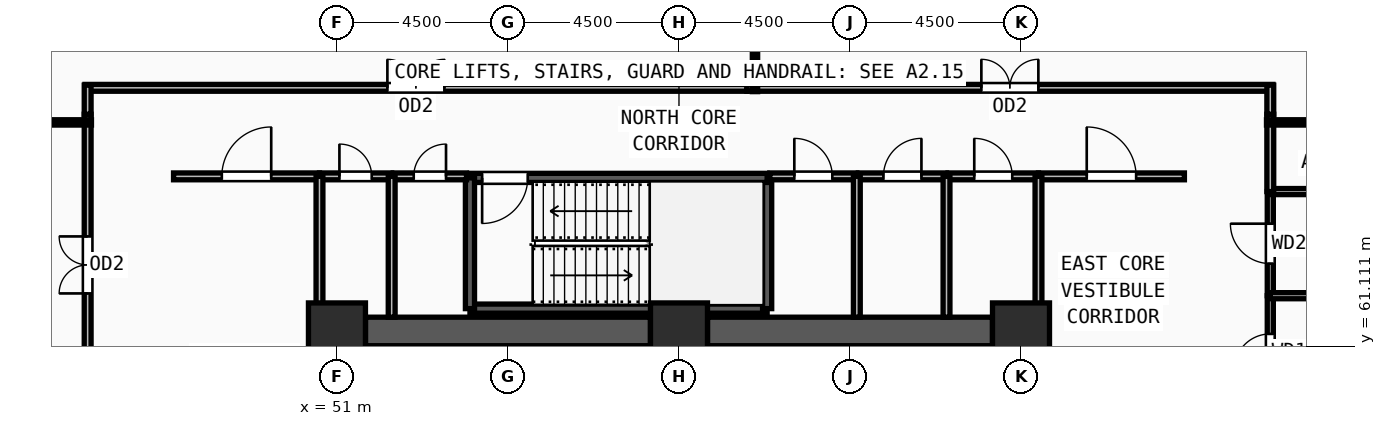
"""IFC4 building model, lengths in metres.
Left out: names, types, materials, properties, quantities, classifications, styles, units other than length and angle.
Written with IfcOpenShell. Run it as: python <this file> out.ifc"""

import sys

from ifc_helpers import new_model, si_unit, direction, frame, frame_2d, origin, origin_2d, place, context, subcontext, project, spatial, rectangle, extrude, source, transform, mapped, element, fill, save


model = new_model("IFC4")
c1 = context("Model", 3, precision=1e-05, world=origin(), true_north=direction((0.0, 1.0)))
c2 = subcontext(c1, "Body", "Model", "MODEL_VIEW")
j1 = project(units=[si_unit("LENGTHUNIT", "METRE"), si_unit("PLANEANGLEUNIT", "RADIAN")], contexts=[c1])
p1 = place(None, origin())
s1 = spatial("IfcSite", under=j1, at=p1, CompositionType="ELEMENT")
p2 = place(p1, origin())
s2 = spatial("IfcBuilding", under=s1, at=p2, CompositionType="ELEMENT")
p3 = place(p2, frame((0.0, 0.0, 166.5)))
s3 = spatial("IfcBuildingStorey", under=s2, at=p3, CompositionType="ELEMENT", Elevation=166.5)
m1 = source(origin(), c2, "Body", "SweptSolid", [
    extrude(rectangle(XDim=1.5, YDim=1.5, at=origin_2d()), origin(), (0.0, 0.0, 1.0), 3.75),
])
for number, where, z_axis, x_axis in (
    (1, (69.0, 61.5, 0.0), (0.0, 0.0, 1.0), (1.0, 0.0, 0.0)),
    (2, (60.0, 61.5, 0.0), (0.0, 0.0, 1.0), (1.0, 0.0, 0.0)),
    (3, (51.0, 61.5, 0.0), (0.0, 0.0, 1.0), (1.0, 0.0, 0.0)),
):
    element("IfcColumn", number, at=place(p3, frame(where, z_axis=z_axis, x_axis=x_axis)), inside=s3, PredefinedType="COLUMN", context=c2, shape_type="MappedRepresentation", body=[
        mapped(m1, transform((0.0, 0.0, 0.0), x_axis=(1.0, 0.0, 0.0), y_axis=(0.0, 1.0, 0.0), z_axis=(0.0, 0.0, 1.0), scale=1.0)),
    ])
for number, where, z_axis, x_axis in (
    (4, (51.75, 61.5, 0.0), (0.0, 0.0, 1.0), (1.0, 0.0, 0.0)),
    (5, (60.75, 61.5, 0.0), (0.0, 0.0, 1.0), (1.0, 0.0, 0.0)),
):
    element("IfcWall", number, at=place(p3, frame(where, z_axis=z_axis, x_axis=x_axis)), inside=s3, PredefinedType="SHEAR", context=c2, shape_type="SweptSolid", body=[
        extrude(rectangle(XDim=7.5, YDim=0.75, at=frame_2d((3.75, 0.0))), origin(), (0.0, 0.0, 1.0), 3.57),
    ])
p4 = place(p3, frame((54.5, 62.1, 0.0), z_axis=(0.0, 0.0, 1.0), x_axis=(1.0, 0.0, 0.0)))
e6 = element("IfcWall", 6, at=p4, inside=s3, PredefinedType="SOLIDWALL", context=c2, shape_type="SweptSolid", body=[
    extrude(rectangle(XDim=7.82, YDim=0.24, at=frame_2d((3.91, 0.0))), origin(), (0.0, 0.0, 1.0), 3.57),
])
p5 = place(p3, frame((62.32, 62.1, 0.0), z_axis=(0.0, 0.0, 1.0), x_axis=(0.0, 1.0, 0.0)))
e7 = element("IfcWall", 7, at=p5, inside=s3, PredefinedType="SOLIDWALL", context=c2, shape_type="SweptSolid", body=[
    extrude(rectangle(XDim=3.44, YDim=0.24, at=frame_2d((1.72, 0.0))), origin(), (0.0, 0.0, 1.0), 3.57),
])
p6 = place(p3, frame((62.32, 65.54, 0.0), z_axis=(0.0, 0.0, 1.0), x_axis=(-1.0, 0.0, 0.0)))
e8 = element("IfcWall", 8, at=p6, inside=s3, PredefinedType="SOLIDWALL", context=c2, shape_type="SweptSolid", body=[
    extrude(rectangle(XDim=7.82, YDim=0.24, at=frame_2d((3.91, 0.0))), origin(), (0.0, 0.0, 1.0), 3.57),
])
m2 = source(origin(), c2, "Body", "SweptSolid", [
    extrude(rectangle(XDim=1.2, YDim=2.2, at=frame_2d((0.6, 1.1))), frame((0.0, 0.13, 0.0), z_axis=(0.0, -1.0, 0.0), x_axis=(1.0, 0.0, 0.0)), (0.0, 0.0, 1.0), 0.26),
])
p7 = place(p6, frame((6.3, 0.0, 0.0)))
e9 = element("IfcOpeningElement", 9, at=p7, cuts=e8, PredefinedType="OPENING", context=c2, shape_type="MappedRepresentation", body=[
    mapped(m2, transform((0.0, 0.0, 0.0), x_axis=(1.0, 0.0, 0.0), y_axis=(0.0, 1.0, 0.0), z_axis=(0.0, 0.0, 1.0), scale=1.0)),
])
p8 = place(p3, frame((54.5, 65.54, 0.0), z_axis=(0.0, 0.0, 1.0), x_axis=(0.0, -1.0, 0.0)))
e10 = element("IfcWall", 10, at=p8, inside=s3, PredefinedType="SOLIDWALL", context=c2, shape_type="SweptSolid", body=[
    extrude(rectangle(XDim=3.44, YDim=0.24, at=frame_2d((1.72, 0.0))), origin(), (0.0, 0.0, 1.0), 3.57),
])
p9 = place(p3, frame((75.56, 59.48, 0.0), z_axis=(0.0, 0.0, 1.0), x_axis=(0.0, 1.0, 0.0)))
e11 = element("IfcWall", 11, at=p9, inside=s3, PredefinedType="PARTITIONING", context=c2, shape_type="SweptSolid", body=[
    extrude(rectangle(XDim=2.96, YDim=0.16, at=frame_2d((1.48, 0.0))), origin(), (0.0, 0.0, 1.0), 3.57),
])
m3 = source(origin(), c2, "Body", "SweptSolid", [
    extrude(rectangle(XDim=0.95, YDim=2.15, at=frame_2d((0.475, 1.075))), frame((0.0, 0.09, 0.0), z_axis=(0.0, -1.0, 0.0), x_axis=(1.0, 0.0, 0.0)), (0.0, 0.0, 1.0), 0.18),
])
p10 = place(p9, frame((1.005, 0.0, 0.0)))
e12 = element("IfcOpeningElement", 12, at=p10, cuts=e11, PredefinedType="OPENING", context=c2, shape_type="MappedRepresentation", body=[
    mapped(m3, transform((0.0, 0.0, 0.0), x_axis=(1.0, 0.0, 0.0), y_axis=(0.0, 1.0, 0.0), z_axis=(0.0, 0.0, 1.0), scale=1.0)),
])
p11 = place(p3, frame((75.56, 62.44, 0.0), z_axis=(0.0, 0.0, 1.0), x_axis=(0.0, 1.0, 0.0)))
e13 = element("IfcWall", 13, at=p11, inside=s3, PredefinedType="PARTITIONING", context=c2, shape_type="SweptSolid", body=[
    extrude(rectangle(XDim=2.74, YDim=0.16, at=frame_2d((1.37, 0.0))), origin(), (0.0, 0.0, 1.0), 3.57),
])
m4 = source(origin(), c2, "Body", "SweptSolid", [
    extrude(rectangle(XDim=1.05, YDim=2.15, at=frame_2d((0.525, 1.075))), frame((0.0, 0.09, 0.0), z_axis=(0.0, -1.0, 0.0), x_axis=(1.0, 0.0, 0.0)), (0.0, 0.0, 1.0), 0.18),
])
p12 = place(p11, frame((0.845, 0.0, 0.0)))
e14 = element("IfcOpeningElement", 14, at=p12, cuts=e13, PredefinedType="OPENING", context=c2, shape_type="MappedRepresentation", body=[
    mapped(m4, transform((0.0, 0.0, 0.0), x_axis=(1.0, 0.0, 0.0), y_axis=(0.0, 1.0, 0.0), z_axis=(0.0, 0.0, 1.0), scale=1.0)),
])
p13 = place(p3, frame((50.54, 65.58, 0.0), z_axis=(0.0, 0.0, 1.0), x_axis=(1.0, 0.0, 0.0)))
e15 = element("IfcWall", 15, at=p13, inside=s3, PredefinedType="PARTITIONING", context=c2, shape_type="SweptSolid", body=[
    extrude(rectangle(XDim=1.9, YDim=0.18, at=frame_2d((0.95, 0.0))), origin(), (0.0, 0.0, 1.0), 3.57),
])
m5 = source(origin(), c2, "Body", "SweptSolid", [
    extrude(rectangle(XDim=0.85, YDim=2.1, at=frame_2d((0.425, 1.05))), frame((0.0, 0.1, 0.0), z_axis=(0.0, -1.0, 0.0), x_axis=(1.0, 0.0, 0.0)), (0.0, 0.0, 1.0), 0.2),
])
p14 = place(p13, frame((0.525, 0.0, 0.0)))
e16 = element("IfcOpeningElement", 16, at=p14, cuts=e15, PredefinedType="OPENING", context=c2, shape_type="MappedRepresentation", body=[
    mapped(m5, transform((0.0, 0.0, 0.0), x_axis=(1.0, 0.0, 0.0), y_axis=(0.0, 1.0, 0.0), z_axis=(0.0, 0.0, 1.0), scale=1.0)),
])
p15 = place(p3, frame((52.48, 65.58, 0.0), z_axis=(0.0, 0.0, 1.0), x_axis=(1.0, 0.0, 0.0)))
e17 = element("IfcWall", 17, at=p15, inside=s3, PredefinedType="PARTITIONING", context=c2, shape_type="SweptSolid", body=[
    extrude(rectangle(XDim=1.93, YDim=0.18, at=frame_2d((0.965, 0.0))), origin(), (0.0, 0.0, 1.0), 3.57),
])
p16 = place(p15, frame((0.54, 0.0, 0.0)))
e18 = element("IfcOpeningElement", 18, at=p16, cuts=e17, PredefinedType="OPENING", context=c2, shape_type="MappedRepresentation", body=[
    mapped(m5, transform((0.0, 0.0, 0.0), x_axis=(1.0, 0.0, 0.0), y_axis=(0.0, 1.0, 0.0), z_axis=(0.0, 0.0, 1.0), scale=1.0)),
])
p17 = place(p3, frame((62.39, 65.58, 0.0), z_axis=(0.0, 0.0, 1.0), x_axis=(1.0, 0.0, 0.0)))
e19 = element("IfcWall", 19, at=p17, inside=s3, PredefinedType="PARTITIONING", context=c2, shape_type="SweptSolid", body=[
    extrude(rectangle(XDim=2.29, YDim=0.18, at=frame_2d((1.145, 0.0))), origin(), (0.0, 0.0, 1.0), 3.57),
])
m6 = source(origin(), c2, "Body", "SweptSolid", [
    extrude(rectangle(XDim=1.0, YDim=2.2, at=frame_2d((0.5, 1.1))), frame((0.0, 0.1, 0.0), z_axis=(0.0, -1.0, 0.0), x_axis=(1.0, 0.0, 0.0)), (0.0, 0.0, 1.0), 0.2),
])
p18 = place(p17, frame((0.645, 0.0, 0.0)))
e20 = element("IfcOpeningElement", 20, at=p18, cuts=e19, PredefinedType="OPENING", context=c2, shape_type="MappedRepresentation", body=[
    mapped(m6, transform((0.0, 0.0, 0.0), x_axis=(1.0, 0.0, 0.0), y_axis=(0.0, 1.0, 0.0), z_axis=(0.0, 0.0, 1.0), scale=1.0)),
])
p19 = place(p3, frame((64.72, 65.58, 0.0), z_axis=(0.0, 0.0, 1.0), x_axis=(1.0, 0.0, 0.0)))
e21 = element("IfcWall", 21, at=p19, inside=s3, PredefinedType="PARTITIONING", context=c2, shape_type="SweptSolid", body=[
    extrude(rectangle(XDim=2.32, YDim=0.18, at=frame_2d((1.16, 0.0))), origin(), (0.0, 0.0, 1.0), 3.57),
])
p20 = place(p19, frame((0.66, 0.0, 0.0)))
e22 = element("IfcOpeningElement", 22, at=p20, cuts=e21, PredefinedType="OPENING", context=c2, shape_type="MappedRepresentation", body=[
    mapped(m6, transform((0.0, 0.0, 0.0), x_axis=(1.0, 0.0, 0.0), y_axis=(0.0, 1.0, 0.0), z_axis=(0.0, 0.0, 1.0), scale=1.0)),
])
p21 = place(p3, frame((67.08, 65.58, 0.0), z_axis=(0.0, 0.0, 1.0), x_axis=(1.0, 0.0, 0.0)))
e23 = element("IfcWall", 23, at=p21, inside=s3, PredefinedType="PARTITIONING", context=c2, shape_type="SweptSolid", body=[
    extrude(rectangle(XDim=2.38, YDim=0.18, at=frame_2d((1.19, 0.0))), origin(), (0.0, 0.0, 1.0), 3.57),
])
p22 = place(p21, frame((0.69, 0.0, 0.0)))
e24 = element("IfcOpeningElement", 24, at=p22, cuts=e23, PredefinedType="OPENING", context=c2, shape_type="MappedRepresentation", body=[
    mapped(m6, transform((0.0, 0.0, 0.0), x_axis=(1.0, 0.0, 0.0), y_axis=(0.0, 1.0, 0.0), z_axis=(0.0, 0.0, 1.0), scale=1.0)),
])
p23 = place(p3, frame((46.7, 65.58, 0.0), z_axis=(0.0, 0.0, 1.0), x_axis=(1.0, 0.0, 0.0)))
e25 = element("IfcWall", 25, at=p23, inside=s3, PredefinedType="PARTITIONING", context=c2, shape_type="SweptSolid", body=[
    extrude(rectangle(XDim=3.84, YDim=0.18, at=frame_2d((1.92, 0.0))), origin(), (0.0, 0.0, 1.0), 3.57),
])
m7 = source(origin(), c2, "Body", "SweptSolid", [
    extrude(rectangle(XDim=1.3, YDim=2.2, at=frame_2d((0.65, 1.1))), frame((0.0, 0.1, 0.0), z_axis=(0.0, -1.0, 0.0), x_axis=(1.0, 0.0, 0.0)), (0.0, 0.0, 1.0), 0.2),
])
p24 = place(p23, frame((1.27, 0.0, 0.0)))
e26 = element("IfcOpeningElement", 26, at=p24, cuts=e25, PredefinedType="OPENING", context=c2, shape_type="MappedRepresentation", body=[
    mapped(m7, transform((0.0, 0.0, 0.0), x_axis=(1.0, 0.0, 0.0), y_axis=(0.0, 1.0, 0.0), z_axis=(0.0, 0.0, 1.0), scale=1.0)),
])
p25 = place(p3, frame((69.46, 65.58, 0.0), z_axis=(0.0, 0.0, 1.0), x_axis=(1.0, 0.0, 0.0)))
e27 = element("IfcWall", 27, at=p25, inside=s3, PredefinedType="PARTITIONING", context=c2, shape_type="SweptSolid", body=[
    extrude(rectangle(XDim=3.84, YDim=0.18, at=frame_2d((1.92, 0.0))), origin(), (0.0, 0.0, 1.0), 3.57),
])
p26 = place(p25, frame((1.27, 0.0, 0.0)))
e28 = element("IfcOpeningElement", 28, at=p26, cuts=e27, PredefinedType="OPENING", context=c2, shape_type="MappedRepresentation", body=[
    mapped(m7, transform((0.0, 0.0, 0.0), x_axis=(1.0, 0.0, 0.0), y_axis=(0.0, 1.0, 0.0), z_axis=(0.0, 0.0, 1.0), scale=1.0)),
])
p27 = place(p3, frame((61.785, 67.91, 0.0), z_axis=(0.0, 0.0, 1.0), x_axis=(1.0, 0.0, 0.0)))
e29 = element("IfcWall", 29, at=p27, inside=s3, PredefinedType="PARTITIONING", context=c2, shape_type="SweptSolid", body=[
    extrude(rectangle(XDim=13.845, YDim=0.18, at=frame_2d((6.922, 0.0))), origin(), (0.0, 0.0, 1.0), 3.57),
])
m8 = source(origin(), c2, "Body", "SweptSolid", [
    extrude(rectangle(XDim=1.5, YDim=2.2, at=frame_2d((0.75, 1.1))), frame((0.0, 0.1, 0.0), z_axis=(0.0, -1.0, 0.0), x_axis=(1.0, 0.0, 0.0)), (0.0, 0.0, 1.0), 0.2),
])
p28 = place(p27, frame((6.172, 0.0, 0.0)))
e30 = element("IfcOpeningElement", 30, at=p28, cuts=e29, PredefinedType="OPENING", context=c2, shape_type="MappedRepresentation", body=[
    mapped(m8, transform((0.0, 0.0, 0.0), x_axis=(1.0, 0.0, 0.0), y_axis=(0.0, 1.0, 0.0), z_axis=(0.0, 0.0, 1.0), scale=1.0)),
])
p29 = place(p3, frame((44.37, 67.91, 0.0), z_axis=(0.0, 0.0, 1.0), x_axis=(1.0, 0.0, 0.0)))
e31 = element("IfcWall", 31, at=p29, inside=s3, PredefinedType="PARTITIONING", context=c2, shape_type="SweptSolid", body=[
    extrude(rectangle(XDim=17.415, YDim=0.18, at=frame_2d((8.708, 0.0))), origin(), (0.0, 0.0, 1.0), 3.57),
])
p30 = place(p29, frame((7.957, 0.0, 0.0)))
e32 = element("IfcOpeningElement", 32, at=p30, cuts=e31, PredefinedType="OPENING", context=c2, shape_type="MappedRepresentation", body=[
    mapped(m8, transform((0.0, 0.0, 0.0), x_axis=(1.0, 0.0, 0.0), y_axis=(0.0, 1.0, 0.0), z_axis=(0.0, 0.0, 1.0), scale=1.0)),
])
p31 = place(p3, frame((44.44, 59.285, 0.0), z_axis=(0.0, 0.0, 1.0), x_axis=(0.0, 1.0, 0.0)))
e33 = element("IfcWall", 33, at=p31, inside=s3, PredefinedType="PARTITIONING", context=c2, shape_type="SweptSolid", body=[
    extrude(rectangle(XDim=7.93, YDim=0.18, at=frame_2d((3.965, 0.0))), origin(), (0.0, 0.0, 1.0), 3.57),
])
p32 = place(p31, frame((3.215, 0.0, 0.0)))
e34 = element("IfcOpeningElement", 34, at=p32, cuts=e33, PredefinedType="OPENING", context=c2, shape_type="MappedRepresentation", body=[
    mapped(m8, transform((0.0, 0.0, 0.0), x_axis=(1.0, 0.0, 0.0), y_axis=(0.0, 1.0, 0.0), z_axis=(0.0, 0.0, 1.0), scale=1.0)),
])
for number, where, z_axis, x_axis in (
    (35, (75.56, 62.44, 0.0), (0.0, 0.0, 1.0), (1.0, 0.0, 0.0)),
    (36, (75.56, 65.18, 0.0), (0.0, 0.0, 1.0), (1.0, 0.0, 0.0)),
):
    element("IfcWall", number, at=place(p3, frame(where, z_axis=z_axis, x_axis=x_axis)), inside=s3, PredefinedType="PARTITIONING", context=c2, shape_type="SweptSolid", body=[
        extrude(rectangle(XDim=4.46, YDim=0.16, at=frame_2d((2.23, 0.0))), origin(), (0.0, 0.0, 1.0), 3.57),
    ])
p33 = place(p3, frame((50.54, 61.95, 0.0), z_axis=(0.0, 0.0, 1.0), x_axis=(0.0, 1.0, 0.0)))
e37 = element("IfcWall", 37, at=p33, inside=s3, PredefinedType="PARTITIONING", context=c2, shape_type="SweptSolid", body=[
    extrude(rectangle(XDim=3.63, YDim=0.18, at=frame_2d((1.815, 0.0))), origin(), (0.0, 0.0, 1.0), 3.57),
])
for number, where, z_axis, x_axis in (
    (38, (52.44, 61.875, 0.0), (0.0, 0.0, 1.0), (0.0, 1.0, 0.0)),
    (39, (64.68, 61.875, 0.0), (0.0, 0.0, 1.0), (0.0, 1.0, 0.0)),
    (40, (67.04, 61.875, 0.0), (0.0, 0.0, 1.0), (0.0, 1.0, 0.0)),
):
    element("IfcWall", number, at=place(p3, frame(where, z_axis=z_axis, x_axis=x_axis)), inside=s3, PredefinedType="PARTITIONING", context=c2, shape_type="SweptSolid", body=[
        extrude(rectangle(XDim=3.705, YDim=0.18, at=frame_2d((1.853, 0.0))), origin(), (0.0, 0.0, 1.0), 3.57),
    ])
p34 = place(p3, frame((69.46, 61.95, 0.0), z_axis=(0.0, 0.0, 1.0), x_axis=(0.0, 1.0, 0.0)))
e41 = element("IfcWall", 41, at=p34, inside=s3, PredefinedType="PARTITIONING", context=c2, shape_type="SweptSolid", body=[
    extrude(rectangle(XDim=3.63, YDim=0.18, at=frame_2d((1.815, 0.0))), origin(), (0.0, 0.0, 1.0), 3.57),
])
p35 = place(p3, frame((75.56, 67.215, 0.0), z_axis=(0.0, 0.0, 1.0), x_axis=(0.0, -1.0, 0.0)))
e42 = element("IfcWall", 42, at=p35, inside=s3, PredefinedType="PARTITIONING", context=c2, shape_type="SweptSolid", body=[
    extrude(rectangle(XDim=2.035, YDim=0.18, at=frame_2d((1.018, 0.0))), origin(), (0.0, 0.0, 1.0), 3.57),
])
for number, where, z_axis, x_axis in (
    (43, (75.56, 67.98, 0.0), (0.0, 0.0, 1.0), (0.0, -1.0, 0.0)),
    (44, (44.44, 67.215, 0.0), (0.0, 0.0, 1.0), (0.0, 1.0, 0.0)),
):
    element("IfcWall", number, at=place(p3, frame(where, z_axis=z_axis, x_axis=x_axis)), inside=s3, PredefinedType="PARTITIONING", context=c2, shape_type="SweptSolid", body=[
        extrude(rectangle(XDim=0.765, YDim=0.18, at=frame_2d((0.382, 0.0))), origin(), (0.0, 0.0, 1.0), 3.57),
    ])
p36 = place(p3, frame((44.54, 67.0, 0.0), z_axis=(0.0, 0.0, 1.0), x_axis=(-1.0, 0.0, 0.0)))
e45 = element("IfcWall", 45, at=p36, inside=s3, PredefinedType="PARTITIONING", context=c2, shape_type="SweptSolid", body=[
    extrude(rectangle(XDim=19.772, YDim=0.14, at=frame_2d((9.886, 0.0))), origin(), (0.0, 0.0, 1.0), 2.755),
])
p37 = place(p3, frame((75.46, 67.0, 0.0), z_axis=(0.0, 0.0, 1.0), x_axis=(1.0, 0.0, 0.0)))
e46 = element("IfcWall", 46, at=p37, inside=s3, PredefinedType="PARTITIONING", context=c2, shape_type="SweptSolid", body=[
    extrude(rectangle(XDim=19.784, YDim=0.14, at=frame_2d((9.892, 0.0))), origin(), (0.0, 0.0, 1.0), 2.755),
])
p38 = place(p3, frame((62.0, 67.81, 0.0), z_axis=(0.0, 0.0, 1.0), x_axis=(0.0, 1.0, 0.0)))
e47 = element("IfcWall", 47, at=p38, inside=s3, PredefinedType="PARTITIONING", context=c2, shape_type="SweptSolid", body=[
    extrude(rectangle(XDim=11.823, YDim=0.14, at=frame_2d((5.912, 0.0))), origin(), (0.0, 0.0, 1.0), 3.57),
])
m9 = source(origin(), c2, "Body", "SweptSolid", [
    extrude(rectangle(XDim=1.2, YDim=2.2, at=frame_2d((0.6, 1.1))), frame((0.0, 0.025, 0.0), z_axis=(0.0, -1.0, 0.0), x_axis=(1.0, 0.0, 0.0)), (0.0, 0.0, 1.0), 0.05),
])
p39 = place(p7, origin())
e48 = element("IfcDoor", 48, at=p39, inside=s3, OperationType="SINGLE_SWING_RIGHT", PredefinedType="DOOR", context=c2, shape_type="MappedRepresentation", body=[
    mapped(m9, transform((0.0, 0.0, 0.0), x_axis=(1.0, 0.0, 0.0), y_axis=(0.0, 1.0, 0.0), z_axis=(0.0, 0.0, 1.0), scale=1.0)),
])
fill(e9, e48)
m10 = source(origin(), c2, "Body", "SweptSolid", [
    extrude(rectangle(XDim=0.95, YDim=2.15, at=frame_2d((0.475, 1.075))), frame((0.0, 0.025, 0.0), z_axis=(0.0, -1.0, 0.0), x_axis=(1.0, 0.0, 0.0)), (0.0, 0.0, 1.0), 0.05),
])
p40 = place(p10, origin())
e49 = element("IfcDoor", 49, at=p40, inside=s3, OperationType="SINGLE_SWING_LEFT", PredefinedType="DOOR", context=c2, shape_type="MappedRepresentation", body=[
    mapped(m10, transform((0.0, 0.0, 0.0), x_axis=(1.0, 0.0, 0.0), y_axis=(0.0, 1.0, 0.0), z_axis=(0.0, 0.0, 1.0), scale=1.0)),
])
fill(e12, e49)
m11 = source(origin(), c2, "Body", "SweptSolid", [
    extrude(rectangle(XDim=1.05, YDim=2.15, at=frame_2d((0.525, 1.075))), frame((0.0, 0.025, 0.0), z_axis=(0.0, -1.0, 0.0), x_axis=(1.0, 0.0, 0.0)), (0.0, 0.0, 1.0), 0.05),
])
p41 = place(p12, origin())
e50 = element("IfcDoor", 50, at=p41, inside=s3, OperationType="SINGLE_SWING_RIGHT", PredefinedType="DOOR", context=c2, shape_type="MappedRepresentation", body=[
    mapped(m11, transform((0.0, 0.0, 0.0), x_axis=(1.0, 0.0, 0.0), y_axis=(0.0, 1.0, 0.0), z_axis=(0.0, 0.0, 1.0), scale=1.0)),
])
fill(e14, e50)
m12 = source(origin(), c2, "Body", "SweptSolid", [
    extrude(rectangle(XDim=0.85, YDim=2.1, at=frame_2d((0.425, 1.05))), frame((0.0, 0.025, 0.0), z_axis=(0.0, -1.0, 0.0), x_axis=(1.0, 0.0, 0.0)), (0.0, 0.0, 1.0), 0.05),
])
p42 = place(p14, origin())
e51 = element("IfcDoor", 51, at=p42, inside=s3, OperationType="SINGLE_SWING_LEFT", PredefinedType="DOOR", context=c2, shape_type="MappedRepresentation", body=[
    mapped(m12, transform((0.0, 0.0, 0.0), x_axis=(1.0, 0.0, 0.0), y_axis=(0.0, 1.0, 0.0), z_axis=(0.0, 0.0, 1.0), scale=1.0)),
])
fill(e16, e51)
p43 = place(p16, origin())
e52 = element("IfcDoor", 52, at=p43, inside=s3, OperationType="SINGLE_SWING_RIGHT", PredefinedType="DOOR", context=c2, shape_type="MappedRepresentation", body=[
    mapped(m12, transform((0.0, 0.0, 0.0), x_axis=(1.0, 0.0, 0.0), y_axis=(0.0, 1.0, 0.0), z_axis=(0.0, 0.0, 1.0), scale=1.0)),
])
fill(e18, e52)
m13 = source(origin(), c2, "Body", "SweptSolid", [
    extrude(rectangle(XDim=1.0, YDim=2.2, at=frame_2d((0.5, 1.1))), frame((0.0, 0.025, 0.0), z_axis=(0.0, -1.0, 0.0), x_axis=(1.0, 0.0, 0.0)), (0.0, 0.0, 1.0), 0.05),
])
p44 = place(p18, origin())
e53 = element("IfcDoor", 53, at=p44, inside=s3, OperationType="SINGLE_SWING_LEFT", PredefinedType="DOOR", context=c2, shape_type="MappedRepresentation", body=[
    mapped(m13, transform((0.0, 0.0, 0.0), x_axis=(1.0, 0.0, 0.0), y_axis=(0.0, 1.0, 0.0), z_axis=(0.0, 0.0, 1.0), scale=1.0)),
])
fill(e20, e53)
p45 = place(p20, origin())
e54 = element("IfcDoor", 54, at=p45, inside=s3, OperationType="SINGLE_SWING_RIGHT", PredefinedType="DOOR", context=c2, shape_type="MappedRepresentation", body=[
    mapped(m13, transform((0.0, 0.0, 0.0), x_axis=(1.0, 0.0, 0.0), y_axis=(0.0, 1.0, 0.0), z_axis=(0.0, 0.0, 1.0), scale=1.0)),
])
fill(e22, e54)
p46 = place(p22, origin())
e55 = element("IfcDoor", 55, at=p46, inside=s3, OperationType="SINGLE_SWING_LEFT", PredefinedType="DOOR", context=c2, shape_type="MappedRepresentation", body=[
    mapped(m13, transform((0.0, 0.0, 0.0), x_axis=(1.0, 0.0, 0.0), y_axis=(0.0, 1.0, 0.0), z_axis=(0.0, 0.0, 1.0), scale=1.0)),
])
fill(e24, e55)
m14 = source(origin(), c2, "Body", "SweptSolid", [
    extrude(rectangle(XDim=1.3, YDim=2.2, at=frame_2d((0.65, 1.1))), frame((0.0, 0.025, 0.0), z_axis=(0.0, -1.0, 0.0), x_axis=(1.0, 0.0, 0.0)), (0.0, 0.0, 1.0), 0.05),
])
p47 = place(p24, origin())
e56 = element("IfcDoor", 56, at=p47, inside=s3, OperationType="SINGLE_SWING_RIGHT", PredefinedType="DOOR", context=c2, shape_type="MappedRepresentation", body=[
    mapped(m14, transform((0.0, 0.0, 0.0), x_axis=(1.0, 0.0, 0.0), y_axis=(0.0, 1.0, 0.0), z_axis=(0.0, 0.0, 1.0), scale=1.0)),
])
fill(e26, e56)
p48 = place(p26, origin())
e57 = element("IfcDoor", 57, at=p48, inside=s3, OperationType="SINGLE_SWING_LEFT", PredefinedType="DOOR", context=c2, shape_type="MappedRepresentation", body=[
    mapped(m14, transform((0.0, 0.0, 0.0), x_axis=(1.0, 0.0, 0.0), y_axis=(0.0, 1.0, 0.0), z_axis=(0.0, 0.0, 1.0), scale=1.0)),
])
fill(e28, e57)
m15 = source(origin(), c2, "Body", "SweptSolid", [
    extrude(rectangle(XDim=1.5, YDim=2.2, at=frame_2d((0.75, 1.1))), frame((0.0, 0.025, 0.0), z_axis=(0.0, -1.0, 0.0), x_axis=(1.0, 0.0, 0.0)), (0.0, 0.0, 1.0), 0.05),
])
p49 = place(p28, origin())
e58 = element("IfcDoor", 58, at=p49, inside=s3, OperationType="DOUBLE_DOOR_SINGLE_SWING", PredefinedType="DOOR", context=c2, shape_type="MappedRepresentation", body=[
    mapped(m15, transform((0.0, 0.0, 0.0), x_axis=(1.0, 0.0, 0.0), y_axis=(0.0, 1.0, 0.0), z_axis=(0.0, 0.0, 1.0), scale=1.0)),
])
fill(e30, e58)
p50 = place(p30, origin())
e59 = element("IfcDoor", 59, at=p50, inside=s3, OperationType="DOUBLE_DOOR_SINGLE_SWING", PredefinedType="DOOR", context=c2, shape_type="MappedRepresentation", body=[
    mapped(m15, transform((0.0, 0.0, 0.0), x_axis=(1.0, 0.0, 0.0), y_axis=(0.0, 1.0, 0.0), z_axis=(0.0, 0.0, 1.0), scale=1.0)),
])
fill(e32, e59)
p51 = place(p32, origin())
e60 = element("IfcDoor", 60, at=p51, inside=s3, OperationType="DOUBLE_DOOR_SINGLE_SWING", PredefinedType="DOOR", context=c2, shape_type="MappedRepresentation", body=[
    mapped(m15, transform((0.0, 0.0, 0.0), x_axis=(1.0, 0.0, 0.0), y_axis=(0.0, 1.0, 0.0), z_axis=(0.0, 0.0, 1.0), scale=1.0)),
])
fill(e34, e60)
save(model, sys.argv[1])
